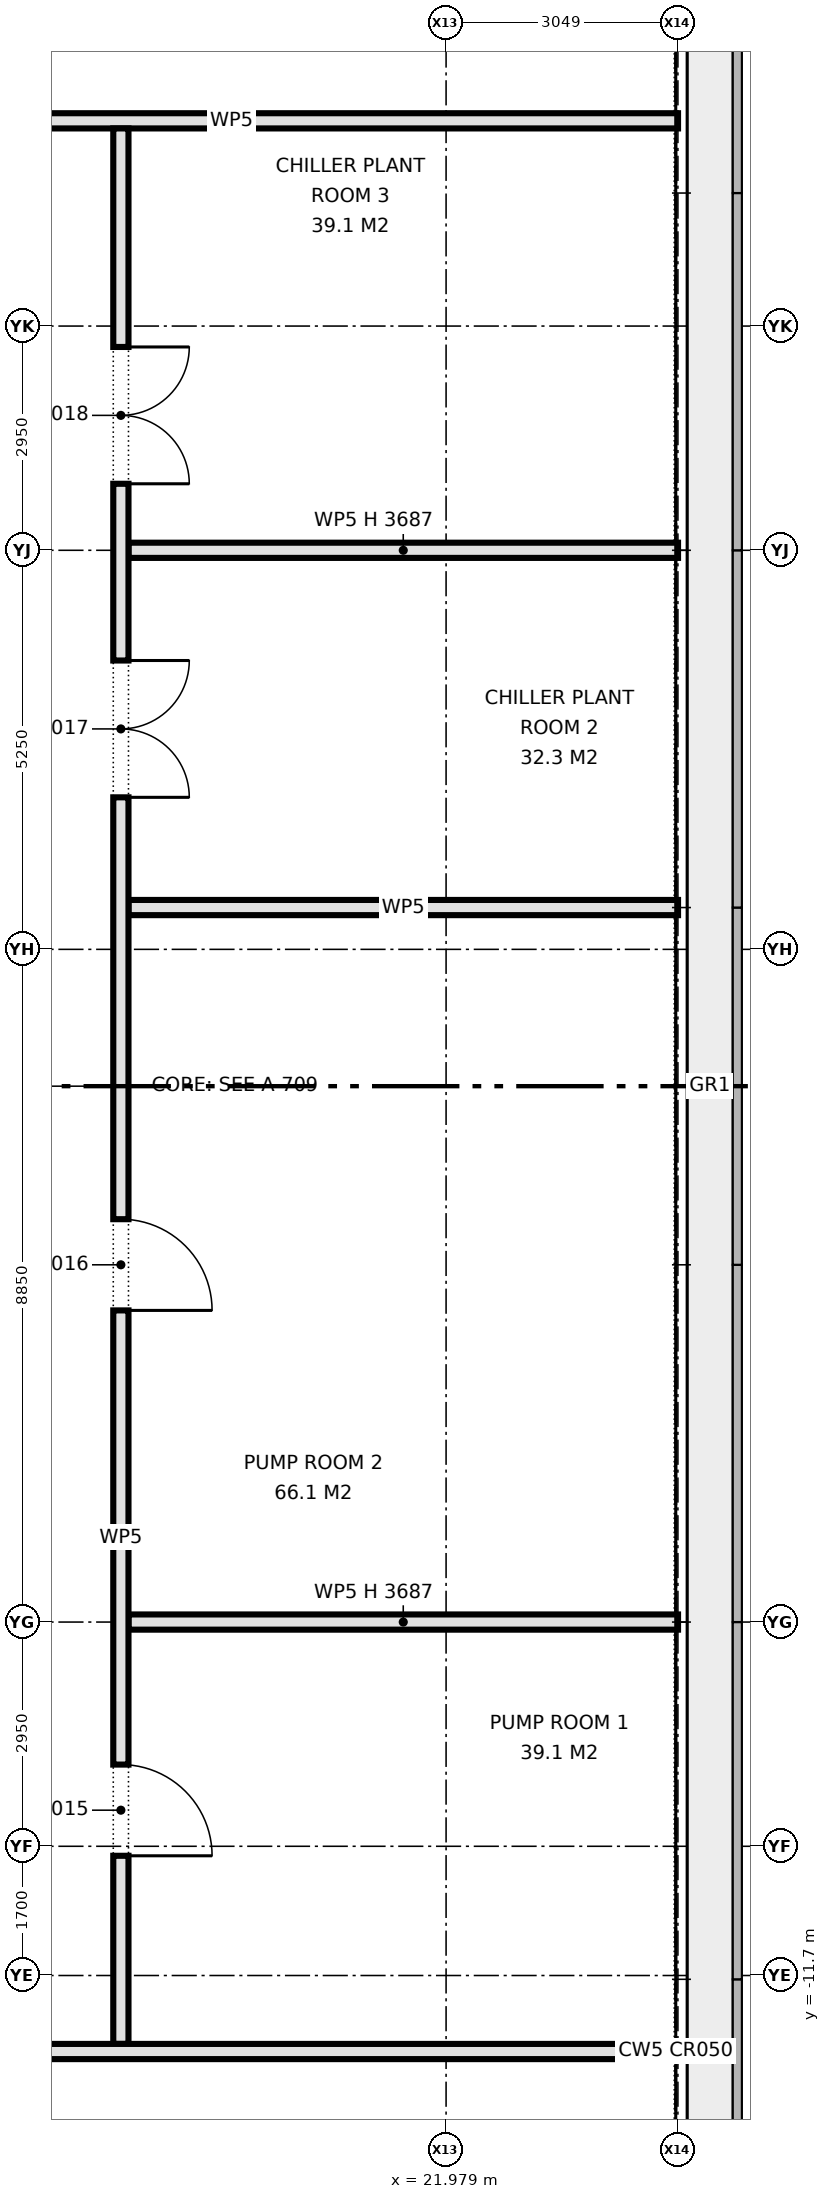
"""IFC4 building model, lengths in metres.
Left out: names, types, materials, properties, quantities, classifications, styles, units other than length and angle.
Written with IfcOpenShell. Run it as: python <this file> out.ifc"""

import sys

from ifc_helpers import new_model, si_unit, direction, frame, frame_2d, origin, place, context, subcontext, project, spatial, rectangle, extrude, element, fill, save


model = new_model("IFC4")
c1 = context("Model", 3, precision=1e-05, world=origin(), true_north=direction((0.0, 1.0)))
c2 = subcontext(c1, "Body", "Model", "MODEL_VIEW")
j1 = project(units=[si_unit("LENGTHUNIT", "METRE"), si_unit("PLANEANGLEUNIT", "RADIAN")], contexts=[c1])
p1 = place(None, origin())
s1 = spatial("IfcSite", under=j1, at=p1, CompositionType="ELEMENT")
p2 = place(p1, origin())
s2 = spatial("IfcBuilding", under=s1, at=p2, CompositionType="ELEMENT")
p3 = place(p2, frame((0.0, 0.0, 64.1)))
s3 = spatial("IfcBuildingStorey", under=s2, at=p3, CompositionType="ELEMENT", Elevation=64.1)
p4 = place(p3, frame((17.8, -7.05, 0.0), z_axis=(0.0, 0.0, 1.0), x_axis=(1.0, 0.0, 0.0)))
e1 = element("IfcWall", 1, at=p4, inside=s3, PredefinedType="PARTITIONING", context=c2, shape_type="SweptSolid", body=[
    extrude(rectangle(XDim=7.23, YDim=0.2, at=frame_2d((3.615, 0.0))), origin(), (0.0, 0.0, 1.0), 3.687),
])
p5 = place(p3, frame((17.8, 2.35, 0.0), z_axis=(0.0, 0.0, 1.0), x_axis=(1.0, 0.0, 0.0)))
e2 = element("IfcWall", 2, at=p5, inside=s3, PredefinedType="PARTITIONING", context=c2, shape_type="SweptSolid", body=[
    extrude(rectangle(XDim=7.23, YDim=0.2, at=frame_2d((3.615, 0.0))), origin(), (0.0, 0.0, 1.0), 4.3),
])
p6 = place(p3, frame((17.8, 7.05, 0.0), z_axis=(0.0, 0.0, 1.0), x_axis=(1.0, 0.0, 0.0)))
e3 = element("IfcWall", 3, at=p6, inside=s3, PredefinedType="PARTITIONING", context=c2, shape_type="SweptSolid", body=[
    extrude(rectangle(XDim=7.23, YDim=0.2, at=frame_2d((3.615, 0.0))), origin(), (0.0, 0.0, 1.0), 3.687),
])
p7 = place(p3, frame((-25.03, 12.7, 0.0), z_axis=(0.0, 0.0, 1.0), x_axis=(1.0, 0.0, 0.0)))
e4 = element("IfcWall", 4, at=p7, inside=s3, PredefinedType="PARTITIONING", context=c2, shape_type="SweptSolid", body=[
    extrude(rectangle(XDim=50.06, YDim=0.2, at=frame_2d((25.03, 0.0))), origin(), (0.0, 0.0, 1.0), 4.3),
])
p8 = place(p7, frame((10.305, 0.0, 0.0)))
e5 = element("IfcOpeningElement", 5, at=p8, cuts=e4, PredefinedType="OPENING", context=c2, shape_type="SweptSolid", body=[
    extrude(rectangle(XDim=1.8, YDim=2.1, at=frame_2d((0.9, 1.05))), frame((0.0, 0.11, 0.0), z_axis=(0.0, -1.0, 0.0), x_axis=(1.0, 0.0, 0.0)), (0.0, 0.0, 1.0), 0.22),
])
p9 = place(p7, frame((15.03, 0.0, 0.0)))
e6 = element("IfcOpeningElement", 6, at=p9, cuts=e4, PredefinedType="OPENING", context=c2, shape_type="SweptSolid", body=[
    extrude(rectangle(XDim=1.2, YDim=2.1, at=frame_2d((0.6, 1.05))), frame((0.0, 0.11, 0.0), z_axis=(0.0, -1.0, 0.0), x_axis=(1.0, 0.0, 0.0)), (0.0, 0.0, 1.0), 0.22),
])
p10 = place(p7, frame((22.08, 0.0, 0.0)))
e7 = element("IfcOpeningElement", 7, at=p10, cuts=e4, PredefinedType="OPENING", context=c2, shape_type="SweptSolid", body=[
    extrude(rectangle(XDim=1.2, YDim=2.1, at=frame_2d((0.6, 1.05))), frame((0.0, 0.11, 0.0), z_axis=(0.0, -1.0, 0.0), x_axis=(1.0, 0.0, 0.0)), (0.0, 0.0, 1.0), 0.22),
])
p11 = place(p7, frame((28.83, 0.0, 0.0)))
e8 = element("IfcOpeningElement", 8, at=p11, cuts=e4, PredefinedType="OPENING", context=c2, shape_type="SweptSolid", body=[
    extrude(rectangle(XDim=1.8, YDim=2.1, at=frame_2d((0.9, 1.05))), frame((0.0, 0.11, 0.0), z_axis=(0.0, -1.0, 0.0), x_axis=(1.0, 0.0, 0.0)), (0.0, 0.0, 1.0), 0.22),
])
p12 = place(p7, frame((36.51, 0.0, 0.0)))
e9 = element("IfcOpeningElement", 9, at=p12, cuts=e4, PredefinedType="OPENING", context=c2, shape_type="SweptSolid", body=[
    extrude(rectangle(XDim=1.8, YDim=2.1, at=frame_2d((0.9, 1.05))), frame((0.0, 0.11, 0.0), z_axis=(0.0, -1.0, 0.0), x_axis=(1.0, 0.0, 0.0)), (0.0, 0.0, 1.0), 0.22),
])
p13 = place(p3, frame((17.7, -12.6, 0.0), z_axis=(0.0, 0.0, 1.0), x_axis=(0.0, 1.0, 0.0)))
e10 = element("IfcWall", 10, at=p13, inside=s3, PredefinedType="PARTITIONING", context=c2, shape_type="SweptSolid", body=[
    extrude(rectangle(XDim=25.2, YDim=0.2, at=frame_2d((12.6, 0.0))), origin(), (0.0, 0.0, 1.0), 4.3),
])
p14 = place(p13, frame((2.475, 0.0, 0.0)))
e11 = element("IfcOpeningElement", 11, at=p14, cuts=e10, PredefinedType="OPENING", context=c2, shape_type="SweptSolid", body=[
    extrude(rectangle(XDim=1.2, YDim=2.1, at=frame_2d((0.6, 1.05))), frame((0.0, 0.11, 0.0), z_axis=(0.0, -1.0, 0.0), x_axis=(1.0, 0.0, 0.0)), (0.0, 0.0, 1.0), 0.22),
])
p15 = place(p13, frame((9.65, 0.0, 0.0)))
e12 = element("IfcOpeningElement", 12, at=p15, cuts=e10, PredefinedType="OPENING", context=c2, shape_type="SweptSolid", body=[
    extrude(rectangle(XDim=1.2, YDim=2.1, at=frame_2d((0.6, 1.05))), frame((0.0, 0.11, 0.0), z_axis=(0.0, -1.0, 0.0), x_axis=(1.0, 0.0, 0.0)), (0.0, 0.0, 1.0), 0.22),
])
p16 = place(p13, frame((16.4, 0.0, 0.0)))
e13 = element("IfcOpeningElement", 13, at=p16, cuts=e10, PredefinedType="OPENING", context=c2, shape_type="SweptSolid", body=[
    extrude(rectangle(XDim=1.8, YDim=2.1, at=frame_2d((0.9, 1.05))), frame((0.0, 0.11, 0.0), z_axis=(0.0, -1.0, 0.0), x_axis=(1.0, 0.0, 0.0)), (0.0, 0.0, 1.0), 0.22),
])
p17 = place(p13, frame((20.525, 0.0, 0.0)))
e14 = element("IfcOpeningElement", 14, at=p17, cuts=e10, PredefinedType="OPENING", context=c2, shape_type="SweptSolid", body=[
    extrude(rectangle(XDim=1.8, YDim=2.1, at=frame_2d((0.9, 1.05))), frame((0.0, 0.11, 0.0), z_axis=(0.0, -1.0, 0.0), x_axis=(1.0, 0.0, 0.0)), (0.0, 0.0, 1.0), 0.22),
])
p18 = place(p3, frame((5.05, -12.7, 0.0), z_axis=(0.0, 0.0, 1.0), x_axis=(1.0, 0.0, 0.0)))
e15 = element("IfcWall", 15, at=p18, inside=s3, PredefinedType="PARTITIONING", context=c2, shape_type="SweptSolid", body=[
    extrude(rectangle(XDim=19.98, YDim=0.2, at=frame_2d((9.99, 0.0))), origin(), (0.0, 0.0, 1.0), 4.3),
])
p19 = place(p14, frame((1.2, 0.0, 0.0), z_axis=(0.0, 0.0, 1.0), x_axis=(-1.0, 0.0, 0.0)))
e16 = element("IfcDoor", 16, at=p19, inside=s3, OperationType="SINGLE_SWING_RIGHT", PredefinedType="DOOR", context=c2, shape_type="SweptSolid", body=[
    extrude(rectangle(XDim=1.2, YDim=2.1, at=frame_2d((0.6, 1.05))), frame((0.0, 0.025, 0.0), z_axis=(0.0, -1.0, 0.0), x_axis=(1.0, 0.0, 0.0)), (0.0, 0.0, 1.0), 0.05),
])
fill(e11, e16)
p20 = place(p15, frame((1.2, 0.0, 0.0), z_axis=(0.0, 0.0, 1.0), x_axis=(-1.0, 0.0, 0.0)))
e17 = element("IfcDoor", 17, at=p20, inside=s3, OperationType="SINGLE_SWING_RIGHT", PredefinedType="DOOR", context=c2, shape_type="SweptSolid", body=[
    extrude(rectangle(XDim=1.2, YDim=2.1, at=frame_2d((0.6, 1.05))), frame((0.0, 0.025, 0.0), z_axis=(0.0, -1.0, 0.0), x_axis=(1.0, 0.0, 0.0)), (0.0, 0.0, 1.0), 0.05),
])
fill(e12, e17)
p21 = place(p16, frame((1.8, 0.0, 0.0), z_axis=(0.0, 0.0, 1.0), x_axis=(-1.0, 0.0, 0.0)))
e18 = element("IfcDoor", 18, at=p21, inside=s3, OperationType="DOUBLE_DOOR_SINGLE_SWING", PredefinedType="DOOR", context=c2, shape_type="SweptSolid", body=[
    extrude(rectangle(XDim=1.8, YDim=2.1, at=frame_2d((0.9, 1.05))), frame((0.0, 0.025, 0.0), z_axis=(0.0, -1.0, 0.0), x_axis=(1.0, 0.0, 0.0)), (0.0, 0.0, 1.0), 0.05),
])
fill(e13, e18)
p22 = place(p17, frame((1.8, 0.0, 0.0), z_axis=(0.0, 0.0, 1.0), x_axis=(-1.0, 0.0, 0.0)))
e19 = element("IfcDoor", 19, at=p22, inside=s3, OperationType="DOUBLE_DOOR_SINGLE_SWING", PredefinedType="DOOR", context=c2, shape_type="SweptSolid", body=[
    extrude(rectangle(XDim=1.8, YDim=2.1, at=frame_2d((0.9, 1.05))), frame((0.0, 0.025, 0.0), z_axis=(0.0, -1.0, 0.0), x_axis=(1.0, 0.0, 0.0)), (0.0, 0.0, 1.0), 0.05),
])
fill(e14, e19)
save(model, sys.argv[1])
